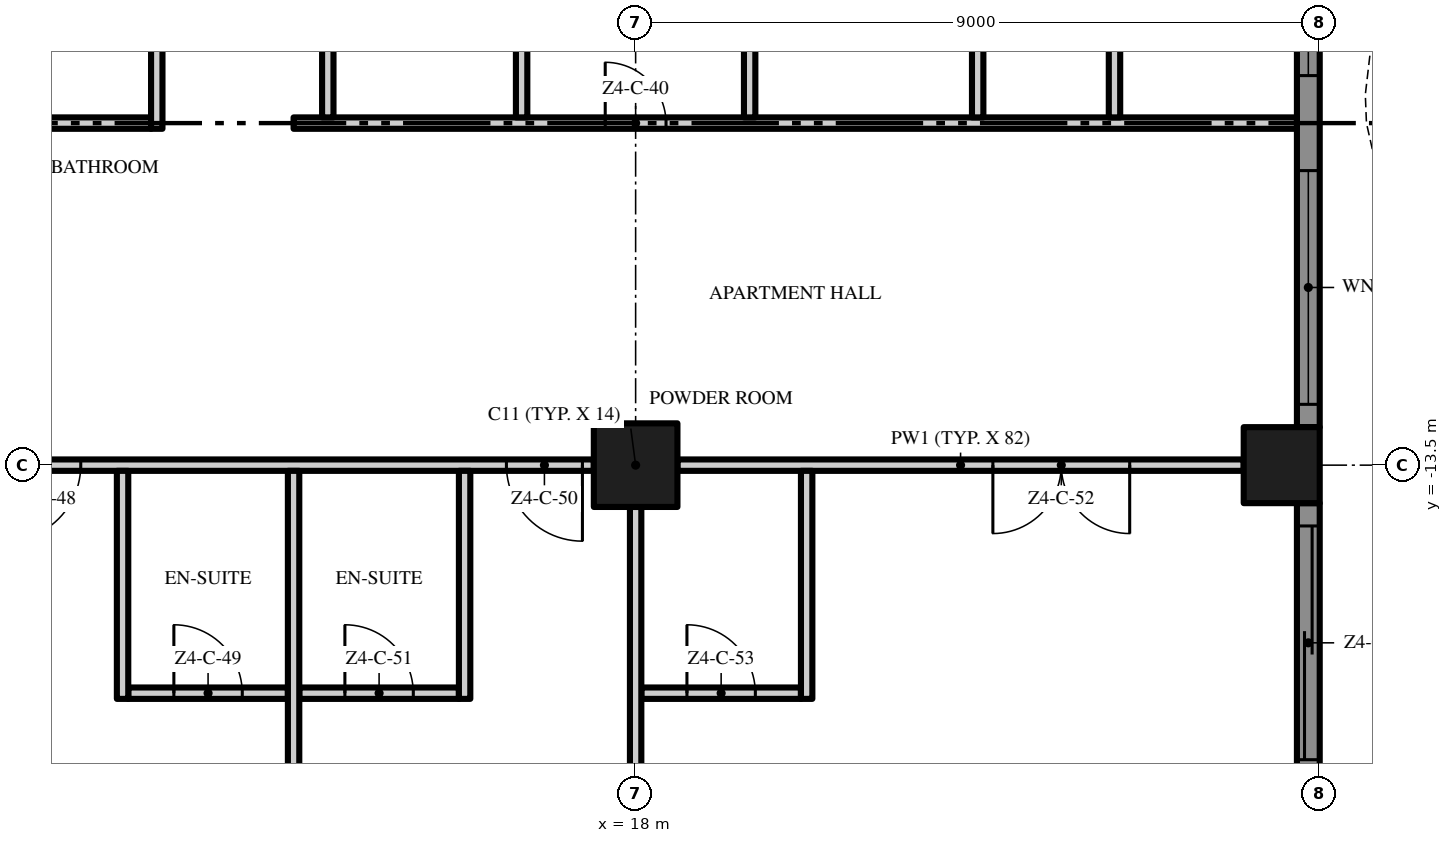
"""IFC4 building model, lengths in metres.
Left out: names, types, materials, properties, quantities, classifications, styles, units other than length and angle.
Written with IfcOpenShell. Run it as: python <this file> out.ifc"""

import sys

from ifc_helpers import new_model, si_unit, direction, frame, frame_2d, origin, origin_2d, place, context, subcontext, project, spatial, polyline, rectangle, outline, extrude, element, fill, save


model = new_model("IFC4")
c1 = context("Model", 3, precision=1e-05, world=origin(), true_north=direction((0.0, 1.0)))
c2 = subcontext(c1, "Body", "Model", "MODEL_VIEW")
j1 = project(units=[si_unit("LENGTHUNIT", "METRE"), si_unit("PLANEANGLEUNIT", "RADIAN")], contexts=[c1])
p1 = place(None, origin())
s1 = spatial("IfcSite", under=j1, at=p1, CompositionType="ELEMENT")
p2 = place(p1, origin())
s2 = spatial("IfcBuilding", under=s1, at=p2, CompositionType="ELEMENT")
p3 = place(p2, frame((0.0, 0.0, 214.8)))
s3 = spatial("IfcBuildingStorey", under=s2, at=p3, CompositionType="ELEMENT", Elevation=214.8)
p4 = place(p3, frame((18.0, -13.5, 0.0), z_axis=(0.0, 0.0, 1.0), x_axis=(1.0, 0.0, 0.0)))
e1 = element("IfcColumn", 1, at=p4, inside=s3, PredefinedType="COLUMN", context=c2, shape_type="SweptSolid", body=[
    extrude(rectangle(XDim=1.1, YDim=1.1, at=origin_2d()), origin(), (0.0, 0.0, 1.0), 3.5),
])
p5 = place(p3, frame((26.5, -13.5, 0.0), z_axis=(0.0, 0.0, 1.0), x_axis=(1.0, 0.0, 0.0)))
e2 = element("IfcColumn", 2, at=p5, inside=s3, PredefinedType="COLUMN", context=c2, shape_type="SweptSolid", body=[
    extrude(rectangle(XDim=1.0, YDim=1.0, at=origin_2d()), origin(), (0.0, 0.0, 1.0), 3.5),
])
p6 = place(p3, frame((26.85, -14.0, 0.0), z_axis=(0.0, 0.0, 1.0), x_axis=(0.0, -1.0, 0.0)))
e3 = element("IfcWall", 3, at=p6, inside=s3, PredefinedType="SOLIDWALL", context=c2, shape_type="SweptSolid", body=[
    extrude(rectangle(XDim=3.7, YDim=0.3, at=frame_2d((1.85, 0.0))), origin(), (0.0, 0.0, 1.0), 3.5),
])
p7 = place(p6, frame((0.3, 0.0, 0.0)))
e4 = element("IfcOpeningElement", 4, at=p7, cuts=e3, PredefinedType="OPENING", context=c2, shape_type="SweptSolid", body=[
    extrude(rectangle(XDim=3.075, YDim=2.4, at=frame_2d((1.538, 1.2))), frame((0.0, 0.16, 0.0), z_axis=(0.0, -1.0, 0.0), x_axis=(1.0, 0.0, 0.0)), (0.0, 0.0, 1.0), 0.32),
])
p8 = place(p3, frame((26.85, -5.0, 0.0), z_axis=(0.0, 0.0, 1.0), x_axis=(0.0, -1.0, 0.0)))
e5 = element("IfcWall", 5, at=p8, inside=s3, PredefinedType="SOLIDWALL", context=c2, shape_type="SweptSolid", body=[
    extrude(rectangle(XDim=8.0, YDim=0.3, at=frame_2d((4.0, 0.0))), origin(), (0.0, 0.0, 1.0), 3.5),
])
p9 = place(p8, frame((4.625, 0.0, 0.45)))
e6 = element("IfcOpeningElement", 6, at=p9, cuts=e5, PredefinedType="OPENING", context=c2, shape_type="SweptSolid", body=[
    extrude(rectangle(XDim=3.075, YDim=2.65, at=frame_2d((1.538, 1.325))), frame((0.0, 0.16, 0.0), z_axis=(0.0, -1.0, 0.0), x_axis=(1.0, 0.0, 0.0)), (0.0, 0.0, 1.0), 0.32),
])
p10 = place(p8, frame((0.3, 0.0, 0.45)))
e7 = element("IfcOpeningElement", 7, at=p10, cuts=e5, PredefinedType="OPENING", context=c2, shape_type="SweptSolid", body=[
    extrude(rectangle(XDim=3.075, YDim=2.65, at=frame_2d((1.538, 1.325))), frame((0.0, 0.16, 0.0), z_axis=(0.0, -1.0, 0.0), x_axis=(1.0, 0.0, 0.0)), (0.0, 0.0, 1.0), 0.32),
])
p11 = place(p3, origin())
e8 = element("IfcWall", 8, at=p11, inside=s3, PredefinedType="USERDEFINED", context=c2, shape_type="SweptSolid", body=[
    extrude(outline(polyline([(29.649, -18.0), (29.985, -16.5), (30.0, -16.125), (29.869, -15.0), (29.345, -13.5), (28.612, -12.0), (27.951, -10.5), (27.615, -9.0), (27.6, -8.625), (27.731, -7.5), (28.255, -6.0), (28.988, -4.5), (29.649, -3.0), (29.985, -1.5), (30.0, -1.125), (29.869, 0.0), (29.345, 1.5), (28.612, 3.0), (27.951, 4.5), (27.615, 6.0), (27.6, 6.375), (27.731, 7.5), (28.255, 9.0), (28.988, 10.5), (29.649, 12.0), (29.985, 13.5), (30.0, 13.875), (29.869, 15.0), (29.345, 16.5), (28.612, 18.0), (28.388, 17.89), (29.114, 16.404), (29.624, 14.944), (29.749, 13.865), (29.736, 13.533), (29.41, 12.079), (28.761, 10.605), (28.024, 9.096), (27.486, 7.556), (27.349, 6.385), (27.366, 5.967), (27.713, 4.421), (28.385, 2.895), (29.114, 1.404), (29.624, -0.056), (29.749, -1.135), (29.736, -1.467), (29.41, -2.921), (28.761, -4.395), (28.024, -5.904), (27.486, -7.444), (27.349, -8.615), (27.366, -9.033), (27.713, -10.579), (28.385, -12.105), (29.114, -13.596), (29.624, -15.056), (29.749, -16.135), (29.736, -16.467), (29.405, -17.945), (29.649, -18.0)])), origin(), (0.0, 0.0, 1.0), 0.9),
])
p12 = place(p3, frame((11.325, -16.5, 0.0), z_axis=(0.0, 0.0, 1.0), x_axis=(1.0, 0.0, 0.0)))
e9 = element("IfcWall", 9, at=p12, inside=s3, PredefinedType="PARTITIONING", context=c2, shape_type="SweptSolid", body=[
    extrude(rectangle(XDim=2.1, YDim=0.15, at=frame_2d((1.05, 0.0))), origin(), (0.0, 0.0, 1.0), 3.5),
])
p13 = place(p12, frame((0.6, 0.0, 0.0)))
e10 = element("IfcOpeningElement", 10, at=p13, cuts=e9, PredefinedType="OPENING", context=c2, shape_type="SweptSolid", body=[
    extrude(rectangle(XDim=0.9, YDim=2.1, at=frame_2d((0.45, 1.05))), frame((0.0, 0.085, 0.0), z_axis=(0.0, -1.0, 0.0), x_axis=(1.0, 0.0, 0.0)), (0.0, 0.0, 1.0), 0.17),
])
p14 = place(p3, frame((13.575, -16.5, 0.0), z_axis=(0.0, 0.0, 1.0), x_axis=(1.0, 0.0, 0.0)))
e11 = element("IfcWall", 11, at=p14, inside=s3, PredefinedType="PARTITIONING", context=c2, shape_type="SweptSolid", body=[
    extrude(rectangle(XDim=2.1, YDim=0.15, at=frame_2d((1.05, 0.0))), origin(), (0.0, 0.0, 1.0), 3.5),
])
p15 = place(p14, frame((0.6, 0.0, 0.0)))
e12 = element("IfcOpeningElement", 12, at=p15, cuts=e11, PredefinedType="OPENING", context=c2, shape_type="SweptSolid", body=[
    extrude(rectangle(XDim=0.9, YDim=2.1, at=frame_2d((0.45, 1.05))), frame((0.0, 0.085, 0.0), z_axis=(0.0, -1.0, 0.0), x_axis=(1.0, 0.0, 0.0)), (0.0, 0.0, 1.0), 0.17),
])
p16 = place(p3, frame((18.075, -16.5, 0.0), z_axis=(0.0, 0.0, 1.0), x_axis=(1.0, 0.0, 0.0)))
e13 = element("IfcWall", 13, at=p16, inside=s3, PredefinedType="PARTITIONING", context=c2, shape_type="SweptSolid", body=[
    extrude(rectangle(XDim=2.1, YDim=0.15, at=frame_2d((1.05, 0.0))), origin(), (0.0, 0.0, 1.0), 3.5),
])
p17 = place(p16, frame((0.6, 0.0, 0.0)))
e14 = element("IfcOpeningElement", 14, at=p17, cuts=e13, PredefinedType="OPENING", context=c2, shape_type="SweptSolid", body=[
    extrude(rectangle(XDim=0.9, YDim=2.1, at=frame_2d((0.45, 1.05))), frame((0.0, 0.085, 0.0), z_axis=(0.0, -1.0, 0.0), x_axis=(1.0, 0.0, 0.0)), (0.0, 0.0, 1.0), 0.17),
])
p18 = place(p3, frame((17.45, -13.5, 0.0), z_axis=(0.0, 0.0, 1.0), x_axis=(-1.0, 0.0, 0.0)))
e15 = element("IfcWall", 15, at=p18, inside=s3, PredefinedType="PARTITIONING", context=c2, shape_type="SweptSolid", body=[
    extrude(rectangle(XDim=7.9, YDim=0.15, at=frame_2d((3.95, 0.0))), origin(), (0.0, 0.0, 1.0), 3.5),
])
p19 = place(p18, frame((6.75, 0.0, 0.0)))
e16 = element("IfcOpeningElement", 16, at=p19, cuts=e15, PredefinedType="OPENING", context=c2, shape_type="SweptSolid", body=[
    extrude(rectangle(XDim=1.0, YDim=2.4, at=frame_2d((0.5, 1.2))), frame((0.0, 0.085, 0.0), z_axis=(0.0, -1.0, 0.0), x_axis=(1.0, 0.0, 0.0)), (0.0, 0.0, 1.0), 0.17),
])
p20 = place(p18, frame((0.15, 0.0, 0.0)))
e17 = element("IfcOpeningElement", 17, at=p20, cuts=e15, PredefinedType="OPENING", context=c2, shape_type="SweptSolid", body=[
    extrude(rectangle(XDim=1.0, YDim=2.4, at=frame_2d((0.5, 1.2))), frame((0.0, 0.085, 0.0), z_axis=(0.0, -1.0, 0.0), x_axis=(1.0, 0.0, 0.0)), (0.0, 0.0, 1.0), 0.17),
])
p21 = place(p3, frame((26.0, -13.5, 0.0), z_axis=(0.0, 0.0, 1.0), x_axis=(-1.0, 0.0, 0.0)))
e18 = element("IfcWall", 18, at=p21, inside=s3, PredefinedType="PARTITIONING", context=c2, shape_type="SweptSolid", body=[
    extrude(rectangle(XDim=7.45, YDim=0.15, at=frame_2d((3.725, 0.0))), origin(), (0.0, 0.0, 1.0), 3.5),
])
p22 = place(p21, frame((1.5, 0.0, 0.0)))
e19 = element("IfcOpeningElement", 19, at=p22, cuts=e18, PredefinedType="OPENING", context=c2, shape_type="SweptSolid", body=[
    extrude(rectangle(XDim=1.8, YDim=2.4, at=frame_2d((0.9, 1.2))), frame((0.0, 0.085, 0.0), z_axis=(0.0, -1.0, 0.0), x_axis=(1.0, 0.0, 0.0)), (0.0, 0.0, 1.0), 0.17),
])
p23 = place(p3, frame((0.1, -9.0, 0.0), z_axis=(0.0, 0.0, 1.0), x_axis=(1.0, 0.0, 0.0)))
e20 = element("IfcWall", 20, at=p23, inside=s3, PredefinedType="PARTITIONING", context=c2, shape_type="SweptSolid", body=[
    extrude(rectangle(XDim=11.525, YDim=0.15, at=frame_2d((5.763, 0.0))), origin(), (0.0, 0.0, 1.0), 3.5),
])
p24 = place(p23, frame((5.85, 0.0, 0.0)))
e21 = element("IfcOpeningElement", 21, at=p24, cuts=e20, PredefinedType="OPENING", context=c2, shape_type="SweptSolid", body=[
    extrude(rectangle(XDim=1.0, YDim=2.4, at=frame_2d((0.5, 1.2))), frame((0.0, 0.085, 0.0), z_axis=(0.0, -1.0, 0.0), x_axis=(1.0, 0.0, 0.0)), (0.0, 0.0, 1.0), 0.17),
])
p25 = place(p3, frame((13.5, -9.0, 0.0), z_axis=(0.0, 0.0, 1.0), x_axis=(1.0, 0.0, 0.0)))
e22 = element("IfcWall", 22, at=p25, inside=s3, PredefinedType="PARTITIONING", context=c2, shape_type="SweptSolid", body=[
    extrude(rectangle(XDim=13.2, YDim=0.15, at=frame_2d((6.6, 0.0))), origin(), (0.0, 0.0, 1.0), 3.5),
])
p26 = place(p25, frame((4.1, 0.0, 0.0)))
e23 = element("IfcOpeningElement", 23, at=p26, cuts=e22, PredefinedType="OPENING", context=c2, shape_type="SweptSolid", body=[
    extrude(rectangle(XDim=0.8, YDim=2.0, at=frame_2d((0.4, 1.0))), frame((0.0, 0.085, 0.0), z_axis=(0.0, -1.0, 0.0), x_axis=(1.0, 0.0, 0.0)), (0.0, 0.0, 1.0), 0.17),
])
p27 = place(p3, frame((11.25, -16.575, 0.0), z_axis=(0.0, 0.0, 1.0), x_axis=(0.0, 1.0, 0.0)))
e24 = element("IfcWall", 24, at=p27, inside=s3, PredefinedType="PARTITIONING", context=c2, shape_type="SweptSolid", body=[
    extrude(rectangle(XDim=3.0, YDim=0.15, at=frame_2d((1.5, 0.0))), origin(), (0.0, 0.0, 1.0), 3.5),
])
p28 = place(p3, frame((11.7, -9.075, 0.0), z_axis=(0.0, 0.0, 1.0), x_axis=(0.0, 1.0, 0.0)))
e25 = element("IfcWall", 25, at=p28, inside=s3, PredefinedType="PARTITIONING", context=c2, shape_type="SweptSolid", body=[
    extrude(rectangle(XDim=4.65, YDim=0.15, at=frame_2d((2.325, 0.0))), origin(), (0.0, 0.0, 1.0), 3.5),
])
p29 = place(p28, frame((1.875, 0.0, 0.0)))
e26 = element("IfcOpeningElement", 26, at=p29, cuts=e25, PredefinedType="OPENING", context=c2, shape_type="SweptSolid", body=[
    extrude(rectangle(XDim=0.9, YDim=2.1, at=frame_2d((0.45, 1.05))), frame((0.0, 0.085, 0.0), z_axis=(0.0, -1.0, 0.0), x_axis=(1.0, 0.0, 0.0)), (0.0, 0.0, 1.0), 0.17),
])
p30 = place(p3, frame((13.5, -22.2, 0.0), z_axis=(0.0, 0.0, 1.0), x_axis=(0.0, 1.0, 0.0)))
e27 = element("IfcWall", 27, at=p30, inside=s3, PredefinedType="PARTITIONING", context=c2, shape_type="SweptSolid", body=[
    extrude(rectangle(XDim=8.625, YDim=0.15, at=frame_2d((4.312, 0.0))), origin(), (0.0, 0.0, 1.0), 3.5),
])
p31 = place(p3, frame((13.95, -8.925, 0.0), z_axis=(0.0, 0.0, 1.0), x_axis=(0.0, 1.0, 0.0)))
e28 = element("IfcWall", 28, at=p31, inside=s3, PredefinedType="PARTITIONING", context=c2, shape_type="SweptSolid", body=[
    extrude(rectangle(XDim=4.5, YDim=0.15, at=frame_2d((2.25, 0.0))), origin(), (0.0, 0.0, 1.0), 3.5),
])
p32 = place(p3, frame((15.75, -16.575, 0.0), z_axis=(0.0, 0.0, 1.0), x_axis=(0.0, 1.0, 0.0)))
e29 = element("IfcWall", 29, at=p32, inside=s3, PredefinedType="PARTITIONING", context=c2, shape_type="SweptSolid", body=[
    extrude(rectangle(XDim=3.0, YDim=0.15, at=frame_2d((1.5, 0.0))), origin(), (0.0, 0.0, 1.0), 3.5),
])
p33 = place(p3, frame((16.5, -8.925, 0.0), z_axis=(0.0, 0.0, 1.0), x_axis=(0.0, 1.0, 0.0)))
e30 = element("IfcWall", 30, at=p33, inside=s3, PredefinedType="PARTITIONING", context=c2, shape_type="SweptSolid", body=[
    extrude(rectangle(XDim=4.35, YDim=0.15, at=frame_2d((2.175, 0.0))), origin(), (0.0, 0.0, 1.0), 3.5),
])
p34 = place(p3, frame((18.0, -21.5, 0.0), z_axis=(0.0, 0.0, 1.0), x_axis=(0.0, 1.0, 0.0)))
e31 = element("IfcWall", 31, at=p34, inside=s3, PredefinedType="PARTITIONING", context=c2, shape_type="SweptSolid", body=[
    extrude(rectangle(XDim=7.45, YDim=0.15, at=frame_2d((3.725, 0.0))), origin(), (0.0, 0.0, 1.0), 3.5),
])
p35 = place(p3, frame((19.5, -8.925, 0.0), z_axis=(0.0, 0.0, 1.0), x_axis=(0.0, 1.0, 0.0)))
e32 = element("IfcWall", 32, at=p35, inside=s3, PredefinedType="PARTITIONING", context=c2, shape_type="SweptSolid", body=[
    extrude(rectangle(XDim=4.35, YDim=0.15, at=frame_2d((2.175, 0.0))), origin(), (0.0, 0.0, 1.0), 3.5),
])
p36 = place(p3, frame((20.25, -16.575, 0.0), z_axis=(0.0, 0.0, 1.0), x_axis=(0.0, 1.0, 0.0)))
e33 = element("IfcWall", 33, at=p36, inside=s3, PredefinedType="PARTITIONING", context=c2, shape_type="SweptSolid", body=[
    extrude(rectangle(XDim=3.0, YDim=0.15, at=frame_2d((1.5, 0.0))), origin(), (0.0, 0.0, 1.0), 3.5),
])
for number, where, z_axis, x_axis in (
    (34, (22.5, -8.925, 0.0), (0.0, 0.0, 1.0), (0.0, 1.0, 0.0)),
    (35, (24.3, -8.925, 0.0), (0.0, 0.0, 1.0), (0.0, 1.0, 0.0)),
):
    element("IfcWall", number, at=place(p3, frame(where, z_axis=z_axis, x_axis=x_axis)), inside=s3, PredefinedType="PARTITIONING", context=c2, shape_type="SweptSolid", body=[
        extrude(rectangle(XDim=4.35, YDim=0.15, at=frame_2d((2.175, 0.0))), origin(), (0.0, 0.0, 1.0), 3.5),
    ])
p37 = place(p7, origin())
e36 = element("IfcDoor", 36, at=p37, inside=s3, OperationType="SINGLE_SWING_LEFT", PredefinedType="DOOR", context=c2, shape_type="SweptSolid", body=[
    extrude(rectangle(XDim=3.075, YDim=2.4, at=frame_2d((1.538, 1.2))), frame((0.0, 0.025, 0.0), z_axis=(0.0, -1.0, 0.0), x_axis=(1.0, 0.0, 0.0)), (0.0, 0.0, 1.0), 0.05),
])
fill(e4, e36)
p38 = place(p9, origin())
e37 = element("IfcWindow", 37, at=p38, inside=s3, PartitioningType="SINGLE_PANEL", PredefinedType="WINDOW", context=c2, shape_type="SweptSolid", body=[
    extrude(rectangle(XDim=3.075, YDim=2.65, at=frame_2d((1.538, 1.325))), frame((0.0, 0.03, 0.0), z_axis=(0.0, -1.0, 0.0), x_axis=(1.0, 0.0, 0.0)), (0.0, 0.0, 1.0), 0.06),
])
fill(e6, e37)
p39 = place(p10, origin())
e38 = element("IfcWindow", 38, at=p39, inside=s3, PartitioningType="SINGLE_PANEL", PredefinedType="WINDOW", context=c2, shape_type="SweptSolid", body=[
    extrude(rectangle(XDim=3.075, YDim=2.65, at=frame_2d((1.538, 1.325))), frame((0.0, 0.03, 0.0), z_axis=(0.0, -1.0, 0.0), x_axis=(1.0, 0.0, 0.0)), (0.0, 0.0, 1.0), 0.06),
])
fill(e7, e38)
p40 = place(p26, origin())
e39 = element("IfcDoor", 39, at=p40, inside=s3, OperationType="SINGLE_SWING_LEFT", PredefinedType="DOOR", context=c2, shape_type="SweptSolid", body=[
    extrude(rectangle(XDim=0.8, YDim=2.0, at=frame_2d((0.4, 1.0))), frame((0.0, 0.025, 0.0), z_axis=(0.0, -1.0, 0.0), x_axis=(1.0, 0.0, 0.0)), (0.0, 0.0, 1.0), 0.05),
])
fill(e23, e39)
p41 = place(p19, origin())
e40 = element("IfcDoor", 40, at=p41, inside=s3, OperationType="SINGLE_SWING_RIGHT", PredefinedType="DOOR", context=c2, shape_type="SweptSolid", body=[
    extrude(rectangle(XDim=1.0, YDim=2.4, at=frame_2d((0.5, 1.2))), frame((0.0, 0.025, 0.0), z_axis=(0.0, -1.0, 0.0), x_axis=(1.0, 0.0, 0.0)), (0.0, 0.0, 1.0), 0.05),
])
fill(e16, e40)
p42 = place(p13, origin())
e41 = element("IfcDoor", 41, at=p42, inside=s3, OperationType="SINGLE_SWING_LEFT", PredefinedType="DOOR", context=c2, shape_type="SweptSolid", body=[
    extrude(rectangle(XDim=0.9, YDim=2.1, at=frame_2d((0.45, 1.05))), frame((0.0, 0.025, 0.0), z_axis=(0.0, -1.0, 0.0), x_axis=(1.0, 0.0, 0.0)), (0.0, 0.0, 1.0), 0.05),
])
fill(e10, e41)
p43 = place(p20, origin())
e42 = element("IfcDoor", 42, at=p43, inside=s3, OperationType="SINGLE_SWING_LEFT", PredefinedType="DOOR", context=c2, shape_type="SweptSolid", body=[
    extrude(rectangle(XDim=1.0, YDim=2.4, at=frame_2d((0.5, 1.2))), frame((0.0, 0.025, 0.0), z_axis=(0.0, -1.0, 0.0), x_axis=(1.0, 0.0, 0.0)), (0.0, 0.0, 1.0), 0.05),
])
fill(e17, e42)
p44 = place(p15, origin())
e43 = element("IfcDoor", 43, at=p44, inside=s3, OperationType="SINGLE_SWING_LEFT", PredefinedType="DOOR", context=c2, shape_type="SweptSolid", body=[
    extrude(rectangle(XDim=0.9, YDim=2.1, at=frame_2d((0.45, 1.05))), frame((0.0, 0.025, 0.0), z_axis=(0.0, -1.0, 0.0), x_axis=(1.0, 0.0, 0.0)), (0.0, 0.0, 1.0), 0.05),
])
fill(e12, e43)
p45 = place(p22, origin())
e44 = element("IfcDoor", 44, at=p45, inside=s3, OperationType="DOUBLE_DOOR_SINGLE_SWING", PredefinedType="DOOR", context=c2, shape_type="SweptSolid", body=[
    extrude(rectangle(XDim=1.8, YDim=2.4, at=frame_2d((0.9, 1.2))), frame((0.0, 0.025, 0.0), z_axis=(0.0, -1.0, 0.0), x_axis=(1.0, 0.0, 0.0)), (0.0, 0.0, 1.0), 0.05),
])
fill(e19, e44)
p46 = place(p17, origin())
e45 = element("IfcDoor", 45, at=p46, inside=s3, OperationType="SINGLE_SWING_LEFT", PredefinedType="DOOR", context=c2, shape_type="SweptSolid", body=[
    extrude(rectangle(XDim=0.9, YDim=2.1, at=frame_2d((0.45, 1.05))), frame((0.0, 0.025, 0.0), z_axis=(0.0, -1.0, 0.0), x_axis=(1.0, 0.0, 0.0)), (0.0, 0.0, 1.0), 0.05),
])
fill(e14, e45)
save(model, sys.argv[1])
